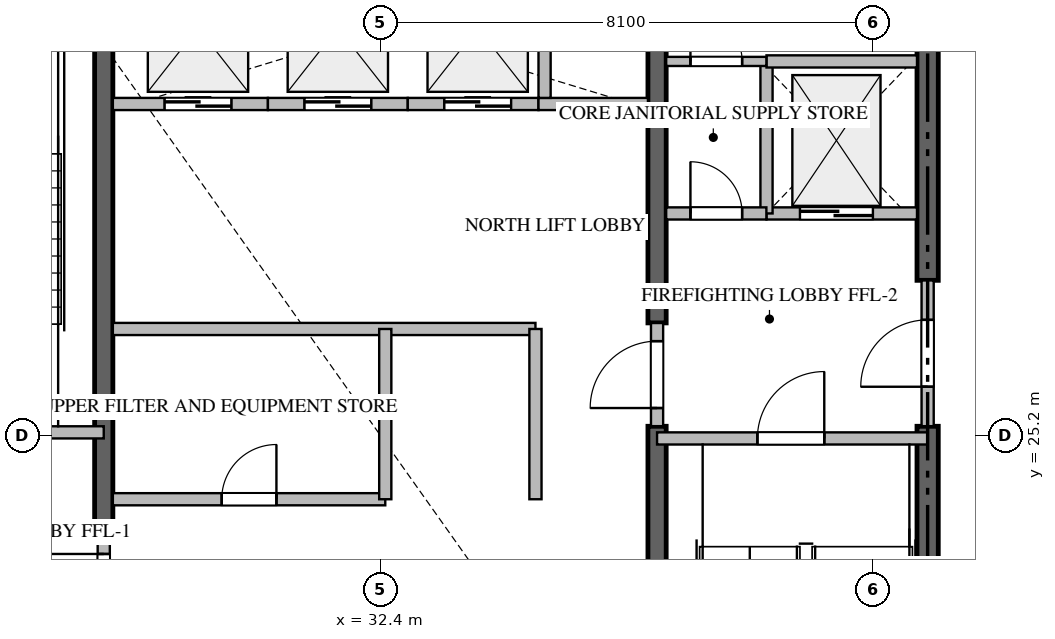
"""IFC4 building model, lengths in metres.
Left out: names, types, materials, properties, quantities, classifications, styles, units other than length and angle.
Written with IfcOpenShell. Run it as: python <this file> out.ifc"""

import sys

from ifc_helpers import new_model, si_unit, direction, frame, frame_2d, origin, place, context, subcontext, project, spatial, rectangle, extrude, source, transform, mapped, element, fill, save


model = new_model("IFC4")
c1 = context("Model", 3, precision=1e-05, world=origin(), true_north=direction((0.0, 1.0)))
c2 = subcontext(c1, "Body", "Model", "MODEL_VIEW")
j1 = project(units=[si_unit("LENGTHUNIT", "METRE"), si_unit("PLANEANGLEUNIT", "RADIAN")], contexts=[c1])
p1 = place(None, origin())
s1 = spatial("IfcSite", under=j1, at=p1, CompositionType="ELEMENT")
p2 = place(p1, origin())
s2 = spatial("IfcBuilding", under=s1, at=p2, CompositionType="ELEMENT")
p3 = place(p2, frame((0.0, 0.0, 252.8)))
s3 = spatial("IfcBuildingStorey", under=s2, at=p3, CompositionType="ELEMENT", Elevation=252.8)
p4 = place(p3, frame((41.4, 16.975, -0.26), z_axis=(0.0, 0.0, 1.0), x_axis=(0.0, 1.0, 0.0)))
e1 = element("IfcWall", 1, at=p4, inside=s3, PredefinedType="SHEAR", context=c2, shape_type="SweptSolid", body=[
    extrude(rectangle(XDim=8.375, YDim=0.35, at=frame_2d((4.188, 0.0))), origin(), (0.0, 0.0, 1.0), 3.848),
])
p5 = place(p3, frame((41.4, 27.75, -0.26), z_axis=(0.0, 0.0, 1.0), x_axis=(0.0, 1.0, 0.0)))
e2 = element("IfcWall", 2, at=p5, inside=s3, PredefinedType="SHEAR", context=c2, shape_type="SweptSolid", body=[
    extrude(rectangle(XDim=5.675, YDim=0.35, at=frame_2d((2.837, 0.0))), origin(), (0.0, 0.0, 1.0), 3.848),
])
p6 = place(p3, frame((27.85, 23.55, -0.26), z_axis=(0.0, 0.0, 1.0), x_axis=(0.0, 1.0, 0.0)))
e3 = element("IfcWall", 3, at=p6, inside=s3, PredefinedType="SHEAR", context=c2, shape_type="SweptSolid", body=[
    extrude(rectangle(XDim=9.875, YDim=0.3, at=frame_2d((4.938, 0.0))), origin(), (0.0, 0.0, 1.0), 3.848),
])
p7 = place(p3, frame((36.95, 16.975, -0.26), z_axis=(0.0, 0.0, 1.0), x_axis=(0.0, 1.0, 0.0)))
e4 = element("IfcWall", 4, at=p7, inside=s3, PredefinedType="SHEAR", context=c2, shape_type="SweptSolid", body=[
    extrude(rectangle(XDim=8.375, YDim=0.3, at=frame_2d((4.188, 0.0))), origin(), (0.0, 0.0, 1.0), 3.848),
])
p8 = place(p3, frame((36.95, 27.05, -0.26), z_axis=(0.0, 0.0, 1.0), x_axis=(0.0, 1.0, 0.0)))
e5 = element("IfcWall", 5, at=p8, inside=s3, PredefinedType="SHEAR", context=c2, shape_type="SweptSolid", body=[
    extrude(rectangle(XDim=6.375, YDim=0.3, at=frame_2d((3.188, 0.0))), origin(), (0.0, 0.0, 1.0), 3.848),
])
p9 = place(p3, frame((23.4, 25.25, 0.0), z_axis=(0.0, 0.0, 1.0), x_axis=(1.0, 0.0, 0.0)))
e6 = element("IfcWall", 6, at=p9, inside=s3, PredefinedType="STANDARD", context=c2, shape_type="SweptSolid", body=[
    extrude(rectangle(XDim=4.45, YDim=0.2, at=frame_2d((2.225, 0.0))), origin(), (0.0, 0.0, 1.0), 3.59),
])
p10 = place(p9, frame((1.65, 0.0, 0.0)))
e7 = element("IfcOpeningElement", 7, at=p10, cuts=e6, PredefinedType="OPENING", context=c2, shape_type="SweptSolid", body=[
    extrude(rectangle(XDim=1.1, YDim=2.15, at=frame_2d((0.55, 1.075))), frame((0.0, 0.11, 0.0), z_axis=(0.0, -1.0, 0.0), x_axis=(1.0, 0.0, 0.0)), (0.0, 0.0, 1.0), 0.22),
])
p11 = place(p3, frame((36.95, 25.15, 0.0), z_axis=(0.0, 0.0, 1.0), x_axis=(1.0, 0.0, 0.0)))
e8 = element("IfcWall", 8, at=p11, inside=s3, PredefinedType="STANDARD", context=c2, shape_type="SweptSolid", body=[
    extrude(rectangle(XDim=4.45, YDim=0.2, at=frame_2d((2.225, 0.0))), origin(), (0.0, 0.0, 1.0), 3.59),
])
p12 = place(p11, frame((1.65, 0.0, 0.0)))
e9 = element("IfcOpeningElement", 9, at=p12, cuts=e8, PredefinedType="OPENING", context=c2, shape_type="SweptSolid", body=[
    extrude(rectangle(XDim=1.1, YDim=2.15, at=frame_2d((0.55, 1.075))), frame((0.0, 0.11, 0.0), z_axis=(0.0, -1.0, 0.0), x_axis=(1.0, 0.0, 0.0)), (0.0, 0.0, 1.0), 0.22),
])
p13 = place(p3, frame((38.75, 28.85, 0.0), z_axis=(0.0, 0.0, 1.0), x_axis=(1.0, 0.0, 0.0)))
e10 = element("IfcWall", 10, at=p13, inside=s3, PredefinedType="STANDARD", context=c2, shape_type="SweptSolid", body=[
    extrude(rectangle(XDim=2.475, YDim=0.2, at=frame_2d((1.238, 0.0))), origin(), (0.0, 0.0, 1.0), 3.59),
])
p14 = place(p13, frame((0.55, 0.0, 0.0)))
e11 = element("IfcOpeningElement", 11, at=p14, cuts=e10, PredefinedType="OPENING", context=c2, shape_type="SweptSolid", body=[
    extrude(rectangle(XDim=1.2, YDim=2.2, at=frame_2d((0.6, 1.1))), frame((0.0, 0.11, 0.0), z_axis=(0.0, -1.0, 0.0), x_axis=(1.0, 0.0, 0.0)), (0.0, 0.0, 1.0), 0.22),
])
p15 = place(p3, frame((28.0, 30.65, 0.0), z_axis=(0.0, 0.0, 1.0), x_axis=(1.0, 0.0, 0.0)))
e12 = element("IfcWall", 12, at=p15, inside=s3, PredefinedType="STANDARD", context=c2, shape_type="SweptSolid", body=[
    extrude(rectangle(XDim=2.55, YDim=0.2, at=frame_2d((1.275, 0.0))), origin(), (0.0, 0.0, 1.0), 3.59),
])
p16 = place(p15, frame((0.85, 0.0, 0.0)))
e13 = element("IfcOpeningElement", 13, at=p16, cuts=e12, PredefinedType="OPENING", context=c2, shape_type="SweptSolid", body=[
    extrude(rectangle(XDim=1.1, YDim=2.2, at=frame_2d((0.55, 1.1))), frame((0.0, 0.11, 0.0), z_axis=(0.0, -1.0, 0.0), x_axis=(1.0, 0.0, 0.0)), (0.0, 0.0, 1.0), 0.22),
])
p17 = place(p3, frame((30.55, 30.65, 0.0), z_axis=(0.0, 0.0, 1.0), x_axis=(1.0, 0.0, 0.0)))
e14 = element("IfcWall", 14, at=p17, inside=s3, PredefinedType="STANDARD", context=c2, shape_type="SweptSolid", body=[
    extrude(rectangle(XDim=2.3, YDim=0.2, at=frame_2d((1.15, 0.0))), origin(), (0.0, 0.0, 1.0), 3.59),
])
p18 = place(p17, frame((0.6, 0.0, 0.0)))
e15 = element("IfcOpeningElement", 15, at=p18, cuts=e14, PredefinedType="OPENING", context=c2, shape_type="SweptSolid", body=[
    extrude(rectangle(XDim=1.1, YDim=2.2, at=frame_2d((0.55, 1.1))), frame((0.0, 0.11, 0.0), z_axis=(0.0, -1.0, 0.0), x_axis=(1.0, 0.0, 0.0)), (0.0, 0.0, 1.0), 0.22),
])
p19 = place(p3, frame((32.85, 30.65, 0.0), z_axis=(0.0, 0.0, 1.0), x_axis=(1.0, 0.0, 0.0)))
e16 = element("IfcWall", 16, at=p19, inside=s3, PredefinedType="STANDARD", context=c2, shape_type="SweptSolid", body=[
    extrude(rectangle(XDim=2.15, YDim=0.2, at=frame_2d((1.075, 0.0))), origin(), (0.0, 0.0, 1.0), 3.59),
])
p20 = place(p19, frame((0.6, 0.0, 0.0)))
e17 = element("IfcOpeningElement", 17, at=p20, cuts=e16, PredefinedType="OPENING", context=c2, shape_type="SweptSolid", body=[
    extrude(rectangle(XDim=1.1, YDim=2.2, at=frame_2d((0.55, 1.1))), frame((0.0, 0.11, 0.0), z_axis=(0.0, -1.0, 0.0), x_axis=(1.0, 0.0, 0.0)), (0.0, 0.0, 1.0), 0.22),
])
p21 = place(p3, frame((35.0, 30.65, 0.0), z_axis=(0.0, 0.0, 1.0), x_axis=(1.0, 0.0, 0.0)))
e18 = element("IfcWall", 18, at=p21, inside=s3, PredefinedType="STANDARD", context=c2, shape_type="SweptSolid", body=[
    extrude(rectangle(XDim=1.8, YDim=0.2, at=frame_2d((0.9, 0.0))), origin(), (0.0, 0.0, 1.0), 3.59),
])
p22 = place(p3, frame((35.1, 30.75, 0.0), z_axis=(0.0, 0.0, 1.0), x_axis=(0.0, 1.0, 0.0)))
e19 = element("IfcWall", 19, at=p22, inside=s3, PredefinedType="STANDARD", context=c2, shape_type="SweptSolid", body=[
    extrude(rectangle(XDim=2.675, YDim=0.2, at=frame_2d((1.337, 0.0))), origin(), (0.0, 0.0, 1.0), 3.59),
])
p23 = place(p3, frame((38.75, 28.85, 0.0), z_axis=(0.0, 0.0, 1.0), x_axis=(0.0, 1.0, 0.0)))
e20 = element("IfcWall", 20, at=p23, inside=s3, PredefinedType="STANDARD", context=c2, shape_type="SweptSolid", body=[
    extrude(rectangle(XDim=2.5, YDim=0.2, at=frame_2d((1.25, 0.0))), origin(), (0.0, 0.0, 1.0), 3.59),
])
p24 = place(p3, frame((38.75, 31.35, 0.0), z_axis=(0.0, 0.0, 1.0), x_axis=(1.0, 0.0, 0.0)))
e21 = element("IfcWall", 21, at=p24, inside=s3, PredefinedType="STANDARD", context=c2, shape_type="SweptSolid", body=[
    extrude(rectangle(XDim=2.475, YDim=0.2, at=frame_2d((1.238, 0.0))), origin(), (0.0, 0.0, 1.0), 3.59),
])
p25 = place(p3, frame((37.1, 28.85, 0.0), z_axis=(0.0, 0.0, 1.0), x_axis=(1.0, 0.0, 0.0)))
e22 = element("IfcWall", 22, at=p25, inside=s3, PredefinedType="STANDARD", context=c2, shape_type="SweptSolid", body=[
    extrude(rectangle(XDim=1.648, YDim=0.2, at=frame_2d((0.824, 0.0))), origin(), (0.0, 0.0, 1.0), 3.59),
])
p26 = place(p25, frame((0.399, 0.0, 0.0)))
e23 = element("IfcOpeningElement", 23, at=p26, cuts=e22, PredefinedType="OPENING", context=c2, shape_type="SweptSolid", body=[
    extrude(rectangle(XDim=0.85, YDim=2.1, at=frame_2d((0.425, 1.05))), frame((0.0, 0.11, 0.0), z_axis=(0.0, -1.0, 0.0), x_axis=(1.0, 0.0, 0.0)), (0.0, 0.0, 1.0), 0.22),
])
p27 = place(p3, frame((41.4, 25.352, 0.0), z_axis=(0.0, 0.0, 1.0), x_axis=(0.0, 1.0, 0.0)))
e24 = element("IfcWall", 24, at=p27, inside=s3, PredefinedType="STANDARD", context=c2, shape_type="SweptSolid", body=[
    extrude(rectangle(XDim=2.396, YDim=0.2, at=frame_2d((1.198, 0.0))), origin(), (0.0, 0.0, 1.0), 3.59),
])
p28 = place(p27, frame((0.648, 0.0, 0.0)))
e25 = element("IfcOpeningElement", 25, at=p28, cuts=e24, PredefinedType="OPENING", context=c2, shape_type="SweptSolid", body=[
    extrude(rectangle(XDim=1.1, YDim=2.15, at=frame_2d((0.55, 1.075))), frame((0.0, 0.11, 0.0), z_axis=(0.0, -1.0, 0.0), x_axis=(1.0, 0.0, 0.0)), (0.0, 0.0, 1.0), 0.22),
])
p29 = place(p3, frame((27.85, 21.852, 0.0), z_axis=(0.0, 0.0, 1.0), x_axis=(0.0, 1.0, 0.0)))
e26 = element("IfcWall", 26, at=p29, inside=s3, PredefinedType="STANDARD", context=c2, shape_type="SweptSolid", body=[
    extrude(rectangle(XDim=1.696, YDim=0.2, at=frame_2d((0.848, 0.0))), origin(), (0.0, 0.0, 1.0), 3.59),
])
p30 = place(p29, frame((0.298, 0.0, 0.0)))
e27 = element("IfcOpeningElement", 27, at=p30, cuts=e26, PredefinedType="OPENING", context=c2, shape_type="SweptSolid", body=[
    extrude(rectangle(XDim=1.1, YDim=2.15, at=frame_2d((0.55, 1.075))), frame((0.0, 0.11, 0.0), z_axis=(0.0, -1.0, 0.0), x_axis=(1.0, 0.0, 0.0)), (0.0, 0.0, 1.0), 0.22),
])
p31 = place(p3, frame((36.95, 25.352, 0.0), z_axis=(0.0, 0.0, 1.0), x_axis=(0.0, 1.0, 0.0)))
e28 = element("IfcWall", 28, at=p31, inside=s3, PredefinedType="STANDARD", context=c2, shape_type="SweptSolid", body=[
    extrude(rectangle(XDim=1.696, YDim=0.2, at=frame_2d((0.848, 0.0))), origin(), (0.0, 0.0, 1.0), 3.59),
])
p32 = place(p31, frame((0.298, 0.0, 0.0)))
e29 = element("IfcOpeningElement", 29, at=p32, cuts=e28, PredefinedType="OPENING", context=c2, shape_type="SweptSolid", body=[
    extrude(rectangle(XDim=1.1, YDim=2.15, at=frame_2d((0.55, 1.075))), frame((0.0, 0.11, 0.0), z_axis=(0.0, -1.0, 0.0), x_axis=(1.0, 0.0, 0.0)), (0.0, 0.0, 1.0), 0.22),
])
p33 = place(p3, frame((37.1, 31.35, 0.0), z_axis=(0.0, 0.0, 1.0), x_axis=(1.0, 0.0, 0.0)))
e30 = element("IfcWall", 30, at=p33, inside=s3, PredefinedType="PARTITIONING", context=c2, shape_type="SweptSolid", body=[
    extrude(rectangle(XDim=1.648, YDim=0.15, at=frame_2d((0.824, 0.0))), origin(), (0.0, 0.0, 1.0), 3.59),
])
p34 = place(p33, frame((0.399, 0.0, 0.0)))
e31 = element("IfcOpeningElement", 31, at=p34, cuts=e30, PredefinedType="OPENING", context=c2, shape_type="SweptSolid", body=[
    extrude(rectangle(XDim=0.85, YDim=2.1, at=frame_2d((0.425, 1.05))), frame((0.0, 0.085, 0.0), z_axis=(0.0, -1.0, 0.0), x_axis=(1.0, 0.0, 0.0)), (0.0, 0.0, 1.0), 0.17),
])
p35 = place(p3, frame((28.0, 26.95, 0.0), z_axis=(0.0, 0.0, 1.0), x_axis=(1.0, 0.0, 0.0)))
e32 = element("IfcWall", 32, at=p35, inside=s3, PredefinedType="STANDARD", context=c2, shape_type="SweptSolid", body=[
    extrude(rectangle(XDim=6.95, YDim=0.2, at=frame_2d((3.475, 0.0))), origin(), (0.0, 0.0, 1.0), 3.59),
])
p36 = place(p3, frame((34.95, 24.15, 0.0), z_axis=(0.0, 0.0, 1.0), x_axis=(0.0, 1.0, 0.0)))
e33 = element("IfcWall", 33, at=p36, inside=s3, PredefinedType="STANDARD", context=c2, shape_type="SweptSolid", body=[
    extrude(rectangle(XDim=2.8, YDim=0.2, at=frame_2d((1.4, 0.0))), origin(), (0.0, 0.0, 1.0), 3.59),
])
p37 = place(p3, frame((28.0, 24.15, 0.0), z_axis=(0.0, 0.0, 1.0), x_axis=(1.0, 0.0, 0.0)))
e34 = element("IfcWall", 34, at=p37, inside=s3, PredefinedType="STANDARD", context=c2, shape_type="SweptSolid", body=[
    extrude(rectangle(XDim=4.48, YDim=0.2, at=frame_2d((2.24, 0.0))), origin(), (0.0, 0.0, 1.0), 3.59),
])
p38 = place(p37, frame((1.79, 0.0, 0.0)))
e35 = element("IfcOpeningElement", 35, at=p38, cuts=e34, PredefinedType="OPENING", context=c2, shape_type="SweptSolid", body=[
    extrude(rectangle(XDim=0.9, YDim=2.1, at=frame_2d((0.45, 1.05))), frame((0.0, 0.11, 0.0), z_axis=(0.0, -1.0, 0.0), x_axis=(1.0, 0.0, 0.0)), (0.0, 0.0, 1.0), 0.22),
])
p39 = place(p3, frame((32.48, 24.15, 0.0), z_axis=(0.0, 0.0, 1.0), x_axis=(0.0, 1.0, 0.0)))
e36 = element("IfcWall", 36, at=p39, inside=s3, PredefinedType="STANDARD", context=c2, shape_type="SweptSolid", body=[
    extrude(rectangle(XDim=2.8, YDim=0.2, at=frame_2d((1.4, 0.0))), origin(), (0.0, 0.0, 1.0), 3.59),
])
m1 = source(origin(), c2, "Body", "SweptSolid", [
    extrude(rectangle(XDim=1.1, YDim=2.15, at=frame_2d((0.55, 1.075))), frame((0.0, 0.025, 0.0), z_axis=(0.0, -1.0, 0.0), x_axis=(1.0, 0.0, 0.0)), (0.0, 0.0, 1.0), 0.05),
])
p40 = place(p12, origin())
e37 = element("IfcDoor", 37, at=p40, inside=s3, OperationType="SINGLE_SWING_RIGHT", PredefinedType="DOOR", context=c2, shape_type="MappedRepresentation", body=[
    mapped(m1, transform((0.0, 0.0, 0.0), scale=1.0)),
])
fill(e9, e37)
m2 = source(origin(), c2, "Body", "SweptSolid", [
    extrude(rectangle(XDim=1.2, YDim=2.2, at=frame_2d((0.6, 1.1))), frame((0.0, 0.025, 0.0), z_axis=(0.0, -1.0, 0.0), x_axis=(1.0, 0.0, 0.0)), (0.0, 0.0, 1.0), 0.05),
])
p41 = place(p14, origin())
e38 = element("IfcDoor", 38, at=p41, inside=s3, OperationType="DOUBLE_DOOR_SLIDING", PredefinedType="DOOR", context=c2, shape_type="MappedRepresentation", body=[
    mapped(m2, transform((0.0, 0.0, 0.0), scale=1.0)),
])
fill(e11, e38)
m3 = source(origin(), c2, "Body", "SweptSolid", [
    extrude(rectangle(XDim=1.1, YDim=2.2, at=frame_2d((0.55, 1.1))), frame((0.0, 0.025, 0.0), z_axis=(0.0, -1.0, 0.0), x_axis=(1.0, 0.0, 0.0)), (0.0, 0.0, 1.0), 0.05),
])
p42 = place(p16, origin())
e39 = element("IfcDoor", 39, at=p42, inside=s3, OperationType="DOUBLE_DOOR_SLIDING", PredefinedType="DOOR", context=c2, shape_type="MappedRepresentation", body=[
    mapped(m3, transform((0.0, 0.0, 0.0), scale=1.0)),
])
fill(e13, e39)
p43 = place(p18, origin())
e40 = element("IfcDoor", 40, at=p43, inside=s3, OperationType="DOUBLE_DOOR_SLIDING", PredefinedType="DOOR", context=c2, shape_type="MappedRepresentation", body=[
    mapped(m3, transform((0.0, 0.0, 0.0), scale=1.0)),
])
fill(e15, e40)
p44 = place(p20, origin())
e41 = element("IfcDoor", 41, at=p44, inside=s3, OperationType="DOUBLE_DOOR_SLIDING", PredefinedType="DOOR", context=c2, shape_type="MappedRepresentation", body=[
    mapped(m3, transform((0.0, 0.0, 0.0), scale=1.0)),
])
fill(e17, e41)
m4 = source(origin(), c2, "Body", "SweptSolid", [
    extrude(rectangle(XDim=0.85, YDim=2.1, at=frame_2d((0.425, 1.05))), frame((0.0, 0.025, 0.0), z_axis=(0.0, -1.0, 0.0), x_axis=(1.0, 0.0, 0.0)), (0.0, 0.0, 1.0), 0.05),
])
p45 = place(p26, origin())
e42 = element("IfcDoor", 42, at=p45, inside=s3, OperationType="SINGLE_SWING_LEFT", PredefinedType="DOOR", context=c2, shape_type="MappedRepresentation", body=[
    mapped(m4, transform((0.0, 0.0, 0.0), scale=1.0)),
])
fill(e23, e42)
p46 = place(p28, origin())
e43 = element("IfcDoor", 43, at=p46, inside=s3, OperationType="SINGLE_SWING_LEFT", PredefinedType="DOOR", context=c2, shape_type="MappedRepresentation", body=[
    mapped(m1, transform((0.0, 0.0, 0.0), scale=1.0)),
])
fill(e25, e43)
p47 = place(p30, origin())
e44 = element("IfcDoor", 44, at=p47, inside=s3, OperationType="SINGLE_SWING_RIGHT", PredefinedType="DOOR", context=c2, shape_type="MappedRepresentation", body=[
    mapped(m1, transform((0.0, 0.0, 0.0), scale=1.0)),
])
fill(e27, e44)
p48 = place(p32, origin())
e45 = element("IfcDoor", 45, at=p48, inside=s3, OperationType="SINGLE_SWING_LEFT", PredefinedType="DOOR", context=c2, shape_type="MappedRepresentation", body=[
    mapped(m1, transform((0.0, 0.0, 0.0), scale=1.0)),
])
fill(e29, e45)
p49 = place(p34, origin())
e46 = element("IfcDoor", 46, at=p49, inside=s3, OperationType="SINGLE_SWING_LEFT", PredefinedType="DOOR", context=c2, shape_type="MappedRepresentation", body=[
    mapped(m4, transform((0.0, 0.0, 0.0), scale=1.0)),
])
fill(e31, e46)
m5 = source(origin(), c2, "Body", "SweptSolid", [
    extrude(rectangle(XDim=0.9, YDim=2.1, at=frame_2d((0.45, 1.05))), frame((0.0, 0.025, 0.0), z_axis=(0.0, -1.0, 0.0), x_axis=(1.0, 0.0, 0.0)), (0.0, 0.0, 1.0), 0.05),
])
p50 = place(p38, origin())
e47 = element("IfcDoor", 47, at=p50, inside=s3, OperationType="SINGLE_SWING_RIGHT", PredefinedType="DOOR", context=c2, shape_type="MappedRepresentation", body=[
    mapped(m5, transform((0.0, 0.0, 0.0), scale=1.0)),
])
fill(e35, e47)
save(model, sys.argv[1])
